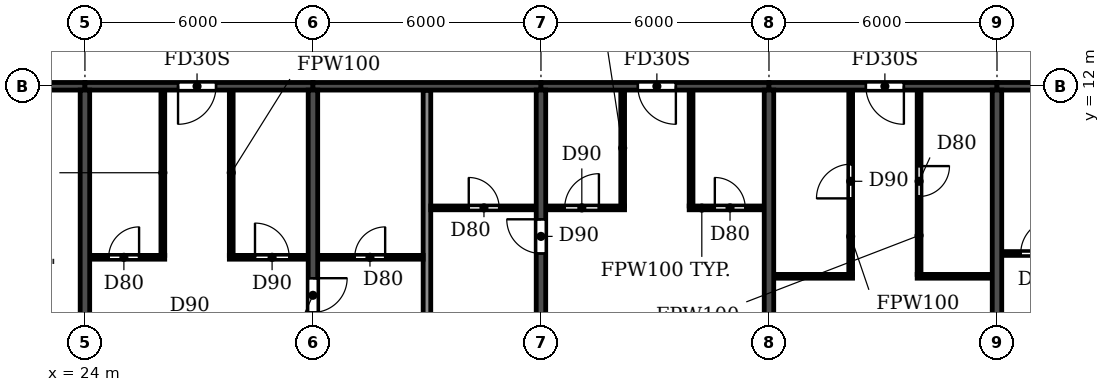
"""IFC4 building model, lengths in metres.
Left out: names, types, materials, properties, quantities, classifications, styles, units other than length and angle.
Written with IfcOpenShell. Run it as: python <this file> out.ifc"""

import sys

from ifc_helpers import new_model, si_unit, direction, frame, frame_2d, origin, place, context, subcontext, project, spatial, rectangle, extrude, element, fill, save


model = new_model("IFC4")
c1 = context("Model", 3, precision=1e-05, world=origin(), true_north=direction((0.0, 1.0)))
c2 = subcontext(c1, "Body", "Model", "MODEL_VIEW")
j1 = project(units=[si_unit("LENGTHUNIT", "METRE"), si_unit("PLANEANGLEUNIT", "RADIAN")], contexts=[c1])
p1 = place(None, origin())
s1 = spatial("IfcSite", under=j1, at=p1, CompositionType="ELEMENT")
p2 = place(p1, origin())
s2 = spatial("IfcBuilding", under=s1, at=p2, CompositionType="ELEMENT")
p3 = place(p2, frame((0.0, 0.0, 257.7)))
s3 = spatial("IfcBuildingStorey", under=s2, at=p3, CompositionType="ELEMENT", Elevation=257.7)
p4 = place(p3, frame((24.0, 0.2, 0.0), z_axis=(0.0, 0.0, 1.0), x_axis=(0.0, 1.0, 0.0)))
e1 = element("IfcWall", 1, at=p4, inside=s3, PredefinedType="SHEAR", context=c2, shape_type="SweptSolid", body=[
    extrude(rectangle(XDim=11.7, YDim=0.25, at=frame_2d((5.85, 0.0))), origin(), (0.0, 0.0, 1.0), 3.0),
])
p5 = place(p3, frame((30.0, 0.2, 0.0), z_axis=(0.0, 0.0, 1.0), x_axis=(0.0, 1.0, 0.0)))
e2 = element("IfcWall", 2, at=p5, inside=s3, PredefinedType="SHEAR", context=c2, shape_type="SweptSolid", body=[
    extrude(rectangle(XDim=11.7, YDim=0.25, at=frame_2d((5.85, 0.0))), origin(), (0.0, 0.0, 1.0), 3.0),
])
p6 = place(p5, frame((5.85, 0.0, 0.0)))
e3 = element("IfcOpeningElement", 3, at=p6, cuts=e2, PredefinedType="OPENING", context=c2, shape_type="SweptSolid", body=[
    extrude(rectangle(XDim=0.9, YDim=2.1, at=frame_2d((0.45, 1.05))), frame((0.0, 0.135, 0.0), z_axis=(0.0, -1.0, 0.0), x_axis=(1.0, 0.0, 0.0)), (0.0, 0.0, 1.0), 0.27),
])
p7 = place(p3, frame((36.0, 0.2, 0.0), z_axis=(0.0, 0.0, 1.0), x_axis=(0.0, 1.0, 0.0)))
e4 = element("IfcWall", 4, at=p7, inside=s3, PredefinedType="SHEAR", context=c2, shape_type="SweptSolid", body=[
    extrude(rectangle(XDim=11.7, YDim=0.25, at=frame_2d((5.85, 0.0))), origin(), (0.0, 0.0, 1.0), 3.0),
])
p8 = place(p7, frame((7.4, 0.0, 0.0)))
e5 = element("IfcOpeningElement", 5, at=p8, cuts=e4, PredefinedType="OPENING", context=c2, shape_type="SweptSolid", body=[
    extrude(rectangle(XDim=0.9, YDim=2.1, at=frame_2d((0.45, 1.05))), frame((0.0, 0.135, 0.0), z_axis=(0.0, -1.0, 0.0), x_axis=(1.0, 0.0, 0.0)), (0.0, 0.0, 1.0), 0.27),
])
for number, where, z_axis, x_axis in (
    (6, (42.0, 0.2, 0.0), (0.0, 0.0, 1.0), (0.0, 1.0, 0.0)),
    (7, (48.0, 0.2, 0.0), (0.0, 0.0, 1.0), (0.0, 1.0, 0.0)),
):
    element("IfcWall", number, at=place(p3, frame(where, z_axis=z_axis, x_axis=x_axis)), inside=s3, PredefinedType="SHEAR", context=c2, shape_type="SweptSolid", body=[
        extrude(rectangle(XDim=11.7, YDim=0.25, at=frame_2d((5.85, 0.0))), origin(), (0.0, 0.0, 1.0), 3.0),
    ])
p9 = place(p3, frame((18.2, 12.0, 0.0), z_axis=(0.0, 0.0, 1.0), x_axis=(1.0, 0.0, 0.0)))
e8 = element("IfcWall", 8, at=p9, inside=s3, PredefinedType="SHEAR", context=c2, shape_type="SweptSolid", body=[
    extrude(rectangle(XDim=5.8, YDim=0.2, at=frame_2d((2.9, 0.0))), origin(), (0.0, 0.0, 1.0), 2.4),
])
p10 = place(p9, frame((2.3, 0.0, 0.0)))
e9 = element("IfcOpeningElement", 9, at=p10, cuts=e8, PredefinedType="OPENING", context=c2, shape_type="SweptSolid", body=[
    extrude(rectangle(XDim=1.0, YDim=2.1, at=frame_2d((0.5, 1.05))), frame((0.0, 0.11, 0.0), z_axis=(0.0, -1.0, 0.0), x_axis=(1.0, 0.0, 0.0)), (0.0, 0.0, 1.0), 0.22),
])
p11 = place(p3, frame((24.0, 12.0, 0.0), z_axis=(0.0, 0.0, 1.0), x_axis=(1.0, 0.0, 0.0)))
e10 = element("IfcWall", 10, at=p11, inside=s3, PredefinedType="SHEAR", context=c2, shape_type="SweptSolid", body=[
    extrude(rectangle(XDim=6.0, YDim=0.2, at=frame_2d((3.0, 0.0))), origin(), (0.0, 0.0, 1.0), 2.4),
])
p12 = place(p11, frame((2.45, 0.0, 0.0)))
e11 = element("IfcOpeningElement", 11, at=p12, cuts=e10, PredefinedType="OPENING", context=c2, shape_type="SweptSolid", body=[
    extrude(rectangle(XDim=1.0, YDim=2.1, at=frame_2d((0.5, 1.05))), frame((0.0, 0.11, 0.0), z_axis=(0.0, -1.0, 0.0), x_axis=(1.0, 0.0, 0.0)), (0.0, 0.0, 1.0), 0.22),
])
p13 = place(p3, frame((30.0, 12.0, 0.0), z_axis=(0.0, 0.0, 1.0), x_axis=(1.0, 0.0, 0.0)))
e12 = element("IfcWall", 12, at=p13, inside=s3, PredefinedType="SHEAR", context=c2, shape_type="SweptSolid", body=[
    extrude(rectangle(XDim=6.0, YDim=0.2, at=frame_2d((3.0, 0.0))), origin(), (0.0, 0.0, 1.0), 2.4),
])
p14 = place(p3, frame((36.0, 12.0, 0.0), z_axis=(0.0, 0.0, 1.0), x_axis=(1.0, 0.0, 0.0)))
e13 = element("IfcWall", 13, at=p14, inside=s3, PredefinedType="SHEAR", context=c2, shape_type="SweptSolid", body=[
    extrude(rectangle(XDim=6.0, YDim=0.2, at=frame_2d((3.0, 0.0))), origin(), (0.0, 0.0, 1.0), 2.4),
])
p15 = place(p14, frame((2.55, 0.0, 0.0)))
e14 = element("IfcOpeningElement", 14, at=p15, cuts=e13, PredefinedType="OPENING", context=c2, shape_type="SweptSolid", body=[
    extrude(rectangle(XDim=1.0, YDim=2.1, at=frame_2d((0.5, 1.05))), frame((0.0, 0.11, 0.0), z_axis=(0.0, -1.0, 0.0), x_axis=(1.0, 0.0, 0.0)), (0.0, 0.0, 1.0), 0.22),
])
p16 = place(p3, frame((42.0, 12.0, 0.0), z_axis=(0.0, 0.0, 1.0), x_axis=(1.0, 0.0, 0.0)))
e15 = element("IfcWall", 15, at=p16, inside=s3, PredefinedType="SHEAR", context=c2, shape_type="SweptSolid", body=[
    extrude(rectangle(XDim=6.0, YDim=0.2, at=frame_2d((3.0, 0.0))), origin(), (0.0, 0.0, 1.0), 2.4),
])
p17 = place(p16, frame((2.55, 0.0, 0.0)))
e16 = element("IfcOpeningElement", 16, at=p17, cuts=e15, PredefinedType="OPENING", context=c2, shape_type="SweptSolid", body=[
    extrude(rectangle(XDim=1.0, YDim=2.1, at=frame_2d((0.5, 1.05))), frame((0.0, 0.11, 0.0), z_axis=(0.0, -1.0, 0.0), x_axis=(1.0, 0.0, 0.0)), (0.0, 0.0, 1.0), 0.22),
])
p18 = place(p3, frame((48.0, 12.0, 0.0), z_axis=(0.0, 0.0, 1.0), x_axis=(1.0, 0.0, 0.0)))
e17 = element("IfcWall", 17, at=p18, inside=s3, PredefinedType="SHEAR", context=c2, shape_type="SweptSolid", body=[
    extrude(rectangle(XDim=6.0, YDim=0.2, at=frame_2d((3.0, 0.0))), origin(), (0.0, 0.0, 1.0), 2.4),
])
p19 = place(p18, frame((2.55, 0.0, 0.0)))
e18 = element("IfcOpeningElement", 18, at=p19, cuts=e17, PredefinedType="OPENING", context=c2, shape_type="SweptSolid", body=[
    extrude(rectangle(XDim=1.0, YDim=2.1, at=frame_2d((0.5, 1.05))), frame((0.0, 0.11, 0.0), z_axis=(0.0, -1.0, 0.0), x_axis=(1.0, 0.0, 0.0)), (0.0, 0.0, 1.0), 0.22),
])
p20 = place(p3, frame((33.0, 0.06, 0.0), z_axis=(0.0, 0.0, 1.0), x_axis=(0.0, 1.0, 0.0)))
e19 = element("IfcWall", 19, at=p20, inside=s3, PredefinedType="PARTITIONING", context=c2, shape_type="SweptSolid", body=[
    extrude(rectangle(XDim=11.83, YDim=0.2, at=frame_2d((5.915, 0.0))), origin(), (0.0, 0.0, 1.0), 3.0),
])
p21 = place(p3, frame((42.135, 7.0, 0.0), z_axis=(0.0, 0.0, 1.0), x_axis=(1.0, 0.0, 0.0)))
e20 = element("IfcWall", 20, at=p21, inside=s3, PredefinedType="PARTITIONING", context=c2, shape_type="SweptSolid", body=[
    extrude(rectangle(XDim=2.065, YDim=0.1, at=frame_2d((1.032, 0.0))), origin(), (0.0, 0.0, 1.0), 3.0),
])
p22 = place(p3, frame((45.9, 7.0, 0.0), z_axis=(0.0, 0.0, 1.0), x_axis=(1.0, 0.0, 0.0)))
e21 = element("IfcWall", 21, at=p22, inside=s3, PredefinedType="PARTITIONING", context=c2, shape_type="SweptSolid", body=[
    extrude(rectangle(XDim=1.965, YDim=0.1, at=frame_2d((0.982, 0.0))), origin(), (0.0, 0.0, 1.0), 3.0),
])
p23 = place(p3, frame((24.135, 7.5, 0.0), z_axis=(0.0, 0.0, 1.0), x_axis=(1.0, 0.0, 0.0)))
e22 = element("IfcWall", 22, at=p23, inside=s3, PredefinedType="PARTITIONING", context=c2, shape_type="SweptSolid", body=[
    extrude(rectangle(XDim=1.965, YDim=0.1, at=frame_2d((0.982, 0.0))), origin(), (0.0, 0.0, 1.0), 3.0),
])
p24 = place(p23, frame((0.49, 0.0, 0.0)))
e23 = element("IfcOpeningElement", 23, at=p24, cuts=e22, PredefinedType="OPENING", context=c2, shape_type="SweptSolid", body=[
    extrude(rectangle(XDim=0.8, YDim=2.1, at=frame_2d((0.4, 1.05))), frame((0.0, 0.06, 0.0), z_axis=(0.0, -1.0, 0.0), x_axis=(1.0, 0.0, 0.0)), (0.0, 0.0, 1.0), 0.12),
])
p25 = place(p3, frame((27.8, 7.5, 0.0), z_axis=(0.0, 0.0, 1.0), x_axis=(1.0, 0.0, 0.0)))
e24 = element("IfcWall", 24, at=p25, inside=s3, PredefinedType="PARTITIONING", context=c2, shape_type="SweptSolid", body=[
    extrude(rectangle(XDim=2.065, YDim=0.1, at=frame_2d((1.032, 0.0))), origin(), (0.0, 0.0, 1.0), 3.0),
])
p26 = place(p25, frame((0.675, 0.0, 0.0)))
e25 = element("IfcOpeningElement", 25, at=p26, cuts=e24, PredefinedType="OPENING", context=c2, shape_type="SweptSolid", body=[
    extrude(rectangle(XDim=0.9, YDim=2.1, at=frame_2d((0.45, 1.05))), frame((0.0, 0.06, 0.0), z_axis=(0.0, -1.0, 0.0), x_axis=(1.0, 0.0, 0.0)), (0.0, 0.0, 1.0), 0.12),
])
p27 = place(p3, frame((30.135, 7.5, 0.0), z_axis=(0.0, 0.0, 1.0), x_axis=(1.0, 0.0, 0.0)))
e26 = element("IfcWall", 26, at=p27, inside=s3, PredefinedType="PARTITIONING", context=c2, shape_type="SweptSolid", body=[
    extrude(rectangle(XDim=2.765, YDim=0.1, at=frame_2d((1.382, 0.0))), origin(), (0.0, 0.0, 1.0), 3.0),
])
p28 = place(p27, frame((0.965, 0.0, 0.0)))
e27 = element("IfcOpeningElement", 27, at=p28, cuts=e26, PredefinedType="OPENING", context=c2, shape_type="SweptSolid", body=[
    extrude(rectangle(XDim=0.8, YDim=2.1, at=frame_2d((0.4, 1.05))), frame((0.0, 0.06, 0.0), z_axis=(0.0, -1.0, 0.0), x_axis=(1.0, 0.0, 0.0)), (0.0, 0.0, 1.0), 0.12),
])
p29 = place(p3, frame((48.135, 7.6, 0.0), z_axis=(0.0, 0.0, 1.0), x_axis=(1.0, 0.0, 0.0)))
e28 = element("IfcWall", 28, at=p29, inside=s3, PredefinedType="PARTITIONING", context=c2, shape_type="SweptSolid", body=[
    extrude(rectangle(XDim=2.065, YDim=0.1, at=frame_2d((1.032, 0.0))), origin(), (0.0, 0.0, 1.0), 3.0),
])
p30 = place(p29, frame((0.49, 0.0, 0.0)))
e29 = element("IfcOpeningElement", 29, at=p30, cuts=e28, PredefinedType="OPENING", context=c2, shape_type="SweptSolid", body=[
    extrude(rectangle(XDim=0.9, YDim=2.1, at=frame_2d((0.45, 1.05))), frame((0.0, 0.06, 0.0), z_axis=(0.0, -1.0, 0.0), x_axis=(1.0, 0.0, 0.0)), (0.0, 0.0, 1.0), 0.12),
])
p31 = place(p3, frame((33.1, 8.8, 0.0), z_axis=(0.0, 0.0, 1.0), x_axis=(1.0, 0.0, 0.0)))
e30 = element("IfcWall", 30, at=p31, inside=s3, PredefinedType="PARTITIONING", context=c2, shape_type="SweptSolid", body=[
    extrude(rectangle(XDim=2.765, YDim=0.1, at=frame_2d((1.382, 0.0))), origin(), (0.0, 0.0, 1.0), 3.0),
])
p32 = place(p31, frame((1.0, 0.0, 0.0)))
e31 = element("IfcOpeningElement", 31, at=p32, cuts=e30, PredefinedType="OPENING", context=c2, shape_type="SweptSolid", body=[
    extrude(rectangle(XDim=0.8, YDim=2.1, at=frame_2d((0.4, 1.05))), frame((0.0, 0.06, 0.0), z_axis=(0.0, -1.0, 0.0), x_axis=(1.0, 0.0, 0.0)), (0.0, 0.0, 1.0), 0.12),
])
p33 = place(p3, frame((36.135, 8.8, 0.0), z_axis=(0.0, 0.0, 1.0), x_axis=(1.0, 0.0, 0.0)))
e32 = element("IfcWall", 32, at=p33, inside=s3, PredefinedType="PARTITIONING", context=c2, shape_type="SweptSolid", body=[
    extrude(rectangle(XDim=2.065, YDim=0.1, at=frame_2d((1.032, 0.0))), origin(), (0.0, 0.0, 1.0), 3.0),
])
p34 = place(p33, frame((0.49, 0.0, 0.0)))
e33 = element("IfcOpeningElement", 33, at=p34, cuts=e32, PredefinedType="OPENING", context=c2, shape_type="SweptSolid", body=[
    extrude(rectangle(XDim=0.9, YDim=2.1, at=frame_2d((0.45, 1.05))), frame((0.0, 0.06, 0.0), z_axis=(0.0, -1.0, 0.0), x_axis=(1.0, 0.0, 0.0)), (0.0, 0.0, 1.0), 0.12),
])
p35 = place(p3, frame((39.9, 8.8, 0.0), z_axis=(0.0, 0.0, 1.0), x_axis=(1.0, 0.0, 0.0)))
e34 = element("IfcWall", 34, at=p35, inside=s3, PredefinedType="PARTITIONING", context=c2, shape_type="SweptSolid", body=[
    extrude(rectangle(XDim=1.965, YDim=0.1, at=frame_2d((0.982, 0.0))), origin(), (0.0, 0.0, 1.0), 3.0),
])
p36 = place(p35, frame((0.675, 0.0, 0.0)))
e35 = element("IfcOpeningElement", 35, at=p36, cuts=e34, PredefinedType="OPENING", context=c2, shape_type="SweptSolid", body=[
    extrude(rectangle(XDim=0.8, YDim=2.1, at=frame_2d((0.4, 1.05))), frame((0.0, 0.06, 0.0), z_axis=(0.0, -1.0, 0.0), x_axis=(1.0, 0.0, 0.0)), (0.0, 0.0, 1.0), 0.12),
])
for number, where, z_axis, x_axis in (
    (36, (26.05, 7.55, 0.0), (0.0, 0.0, 1.0), (0.0, 1.0, 0.0)),
    (37, (27.85, 7.55, 0.0), (0.0, 0.0, 1.0), (0.0, 1.0, 0.0)),
):
    element("IfcWall", number, at=place(p3, frame(where, z_axis=z_axis, x_axis=x_axis)), inside=s3, PredefinedType="PARTITIONING", context=c2, shape_type="SweptSolid", body=[
        extrude(rectangle(XDim=4.34, YDim=0.1, at=frame_2d((2.17, 0.0))), origin(), (0.0, 0.0, 1.0), 3.0),
    ])
for number, where, z_axis, x_axis in (
    (38, (38.15, 8.85, 0.0), (0.0, 0.0, 1.0), (0.0, 1.0, 0.0)),
    (39, (39.95, 8.85, 0.0), (0.0, 0.0, 1.0), (0.0, 1.0, 0.0)),
):
    element("IfcWall", number, at=place(p3, frame(where, z_axis=z_axis, x_axis=x_axis)), inside=s3, PredefinedType="PARTITIONING", context=c2, shape_type="SweptSolid", body=[
        extrude(rectangle(XDim=3.04, YDim=0.1, at=frame_2d((1.52, 0.0))), origin(), (0.0, 0.0, 1.0), 3.0),
    ])
p37 = place(p3, frame((44.15, 7.05, 0.0), z_axis=(0.0, 0.0, 1.0), x_axis=(0.0, 1.0, 0.0)))
e40 = element("IfcWall", 40, at=p37, inside=s3, PredefinedType="PARTITIONING", context=c2, shape_type="SweptSolid", body=[
    extrude(rectangle(XDim=4.84, YDim=0.1, at=frame_2d((2.42, 0.0))), origin(), (0.0, 0.0, 1.0), 3.0),
])
p38 = place(p37, frame((2.0, 0.0, 0.0)))
e41 = element("IfcOpeningElement", 41, at=p38, cuts=e40, PredefinedType="OPENING", context=c2, shape_type="SweptSolid", body=[
    extrude(rectangle(XDim=0.9, YDim=2.1, at=frame_2d((0.45, 1.05))), frame((0.0, 0.06, 0.0), z_axis=(0.0, -1.0, 0.0), x_axis=(1.0, 0.0, 0.0)), (0.0, 0.0, 1.0), 0.12),
])
p39 = place(p3, frame((45.95, 7.05, 0.0), z_axis=(0.0, 0.0, 1.0), x_axis=(0.0, 1.0, 0.0)))
e42 = element("IfcWall", 42, at=p39, inside=s3, PredefinedType="PARTITIONING", context=c2, shape_type="SweptSolid", body=[
    extrude(rectangle(XDim=4.84, YDim=0.1, at=frame_2d((2.42, 0.0))), origin(), (0.0, 0.0, 1.0), 3.0),
])
p40 = place(p39, frame((2.05, 0.0, 0.0)))
e43 = element("IfcOpeningElement", 43, at=p40, cuts=e42, PredefinedType="OPENING", context=c2, shape_type="SweptSolid", body=[
    extrude(rectangle(XDim=0.8, YDim=2.1, at=frame_2d((0.4, 1.05))), frame((0.0, 0.06, 0.0), z_axis=(0.0, -1.0, 0.0), x_axis=(1.0, 0.0, 0.0)), (0.0, 0.0, 1.0), 0.12),
])
p41 = place(p28, origin())
e44 = element("IfcDoor", 44, at=p41, inside=s3, OperationType="SINGLE_SWING_RIGHT", PredefinedType="DOOR", context=c2, shape_type="SweptSolid", body=[
    extrude(rectangle(XDim=0.8, YDim=2.1, at=frame_2d((0.4, 1.05))), frame((0.0, 0.025, 0.0), z_axis=(0.0, -1.0, 0.0), x_axis=(1.0, 0.0, 0.0)), (0.0, 0.0, 1.0), 0.05),
])
fill(e27, e44)
p42 = place(p24, origin())
e45 = element("IfcDoor", 45, at=p42, inside=s3, OperationType="SINGLE_SWING_RIGHT", PredefinedType="DOOR", context=c2, shape_type="SweptSolid", body=[
    extrude(rectangle(XDim=0.8, YDim=2.1, at=frame_2d((0.4, 1.05))), frame((0.0, 0.025, 0.0), z_axis=(0.0, -1.0, 0.0), x_axis=(1.0, 0.0, 0.0)), (0.0, 0.0, 1.0), 0.05),
])
fill(e23, e45)
p43 = place(p12, frame((1.0, 0.0, 0.0), z_axis=(0.0, 0.0, 1.0), x_axis=(-1.0, 0.0, 0.0)))
e46 = element("IfcDoor", 46, at=p43, inside=s3, OperationType="SINGLE_SWING_RIGHT", PredefinedType="DOOR", context=c2, shape_type="SweptSolid", body=[
    extrude(rectangle(XDim=1.0, YDim=2.1, at=frame_2d((0.5, 1.05))), frame((0.0, 0.025, 0.0), z_axis=(0.0, -1.0, 0.0), x_axis=(1.0, 0.0, 0.0)), (0.0, 0.0, 1.0), 0.05),
])
fill(e11, e46)
p44 = place(p26, origin())
e47 = element("IfcDoor", 47, at=p44, inside=s3, OperationType="SINGLE_SWING_LEFT", PredefinedType="DOOR", context=c2, shape_type="SweptSolid", body=[
    extrude(rectangle(XDim=0.9, YDim=2.1, at=frame_2d((0.45, 1.05))), frame((0.0, 0.025, 0.0), z_axis=(0.0, -1.0, 0.0), x_axis=(1.0, 0.0, 0.0)), (0.0, 0.0, 1.0), 0.05),
])
fill(e25, e47)
p45 = place(p6, frame((0.9, 0.0, 0.0), z_axis=(0.0, 0.0, 1.0), x_axis=(-1.0, 0.0, 0.0)))
e48 = element("IfcDoor", 48, at=p45, inside=s3, OperationType="SINGLE_SWING_LEFT", PredefinedType="DOOR", context=c2, shape_type="SweptSolid", body=[
    extrude(rectangle(XDim=0.9, YDim=2.1, at=frame_2d((0.45, 1.05))), frame((0.0, 0.025, 0.0), z_axis=(0.0, -1.0, 0.0), x_axis=(1.0, 0.0, 0.0)), (0.0, 0.0, 1.0), 0.05),
])
fill(e3, e48)
p46 = place(p32, origin())
e49 = element("IfcDoor", 49, at=p46, inside=s3, OperationType="SINGLE_SWING_LEFT", PredefinedType="DOOR", context=c2, shape_type="SweptSolid", body=[
    extrude(rectangle(XDim=0.8, YDim=2.1, at=frame_2d((0.4, 1.05))), frame((0.0, 0.025, 0.0), z_axis=(0.0, -1.0, 0.0), x_axis=(1.0, 0.0, 0.0)), (0.0, 0.0, 1.0), 0.05),
])
fill(e31, e49)
p47 = place(p8, origin())
e50 = element("IfcDoor", 50, at=p47, inside=s3, OperationType="SINGLE_SWING_RIGHT", PredefinedType="DOOR", context=c2, shape_type="SweptSolid", body=[
    extrude(rectangle(XDim=0.9, YDim=2.1, at=frame_2d((0.45, 1.05))), frame((0.0, 0.025, 0.0), z_axis=(0.0, -1.0, 0.0), x_axis=(1.0, 0.0, 0.0)), (0.0, 0.0, 1.0), 0.05),
])
fill(e5, e50)
p48 = place(p34, origin())
e51 = element("IfcDoor", 51, at=p48, inside=s3, OperationType="SINGLE_SWING_RIGHT", PredefinedType="DOOR", context=c2, shape_type="SweptSolid", body=[
    extrude(rectangle(XDim=0.9, YDim=2.1, at=frame_2d((0.45, 1.05))), frame((0.0, 0.025, 0.0), z_axis=(0.0, -1.0, 0.0), x_axis=(1.0, 0.0, 0.0)), (0.0, 0.0, 1.0), 0.05),
])
fill(e33, e51)
p49 = place(p15, frame((1.0, 0.0, 0.0), z_axis=(0.0, 0.0, 1.0), x_axis=(-1.0, 0.0, 0.0)))
e52 = element("IfcDoor", 52, at=p49, inside=s3, OperationType="SINGLE_SWING_LEFT", PredefinedType="DOOR", context=c2, shape_type="SweptSolid", body=[
    extrude(rectangle(XDim=1.0, YDim=2.1, at=frame_2d((0.5, 1.05))), frame((0.0, 0.025, 0.0), z_axis=(0.0, -1.0, 0.0), x_axis=(1.0, 0.0, 0.0)), (0.0, 0.0, 1.0), 0.05),
])
fill(e14, e52)
p50 = place(p36, origin())
e53 = element("IfcDoor", 53, at=p50, inside=s3, OperationType="SINGLE_SWING_LEFT", PredefinedType="DOOR", context=c2, shape_type="SweptSolid", body=[
    extrude(rectangle(XDim=0.8, YDim=2.1, at=frame_2d((0.4, 1.05))), frame((0.0, 0.025, 0.0), z_axis=(0.0, -1.0, 0.0), x_axis=(1.0, 0.0, 0.0)), (0.0, 0.0, 1.0), 0.05),
])
fill(e35, e53)
p51 = place(p38, origin())
e54 = element("IfcDoor", 54, at=p51, inside=s3, OperationType="SINGLE_SWING_LEFT", PredefinedType="DOOR", context=c2, shape_type="SweptSolid", body=[
    extrude(rectangle(XDim=0.9, YDim=2.1, at=frame_2d((0.45, 1.05))), frame((0.0, 0.025, 0.0), z_axis=(0.0, -1.0, 0.0), x_axis=(1.0, 0.0, 0.0)), (0.0, 0.0, 1.0), 0.05),
])
fill(e41, e54)
p52 = place(p17, frame((1.0, 0.0, 0.0), z_axis=(0.0, 0.0, 1.0), x_axis=(-1.0, 0.0, 0.0)))
e55 = element("IfcDoor", 55, at=p52, inside=s3, OperationType="SINGLE_SWING_LEFT", PredefinedType="DOOR", context=c2, shape_type="SweptSolid", body=[
    extrude(rectangle(XDim=1.0, YDim=2.1, at=frame_2d((0.5, 1.05))), frame((0.0, 0.025, 0.0), z_axis=(0.0, -1.0, 0.0), x_axis=(1.0, 0.0, 0.0)), (0.0, 0.0, 1.0), 0.05),
])
fill(e16, e55)
p53 = place(p40, frame((0.8, 0.0, 0.0), z_axis=(0.0, 0.0, 1.0), x_axis=(-1.0, 0.0, 0.0)))
e56 = element("IfcDoor", 56, at=p53, inside=s3, OperationType="SINGLE_SWING_LEFT", PredefinedType="DOOR", context=c2, shape_type="SweptSolid", body=[
    extrude(rectangle(XDim=0.8, YDim=2.1, at=frame_2d((0.4, 1.05))), frame((0.0, 0.025, 0.0), z_axis=(0.0, -1.0, 0.0), x_axis=(1.0, 0.0, 0.0)), (0.0, 0.0, 1.0), 0.05),
])
fill(e43, e56)
p54 = place(p30, origin())
e57 = element("IfcDoor", 57, at=p54, inside=s3, OperationType="SINGLE_SWING_RIGHT", PredefinedType="DOOR", context=c2, shape_type="SweptSolid", body=[
    extrude(rectangle(XDim=0.9, YDim=2.1, at=frame_2d((0.45, 1.05))), frame((0.0, 0.025, 0.0), z_axis=(0.0, -1.0, 0.0), x_axis=(1.0, 0.0, 0.0)), (0.0, 0.0, 1.0), 0.05),
])
fill(e29, e57)
save(model, sys.argv[1])
